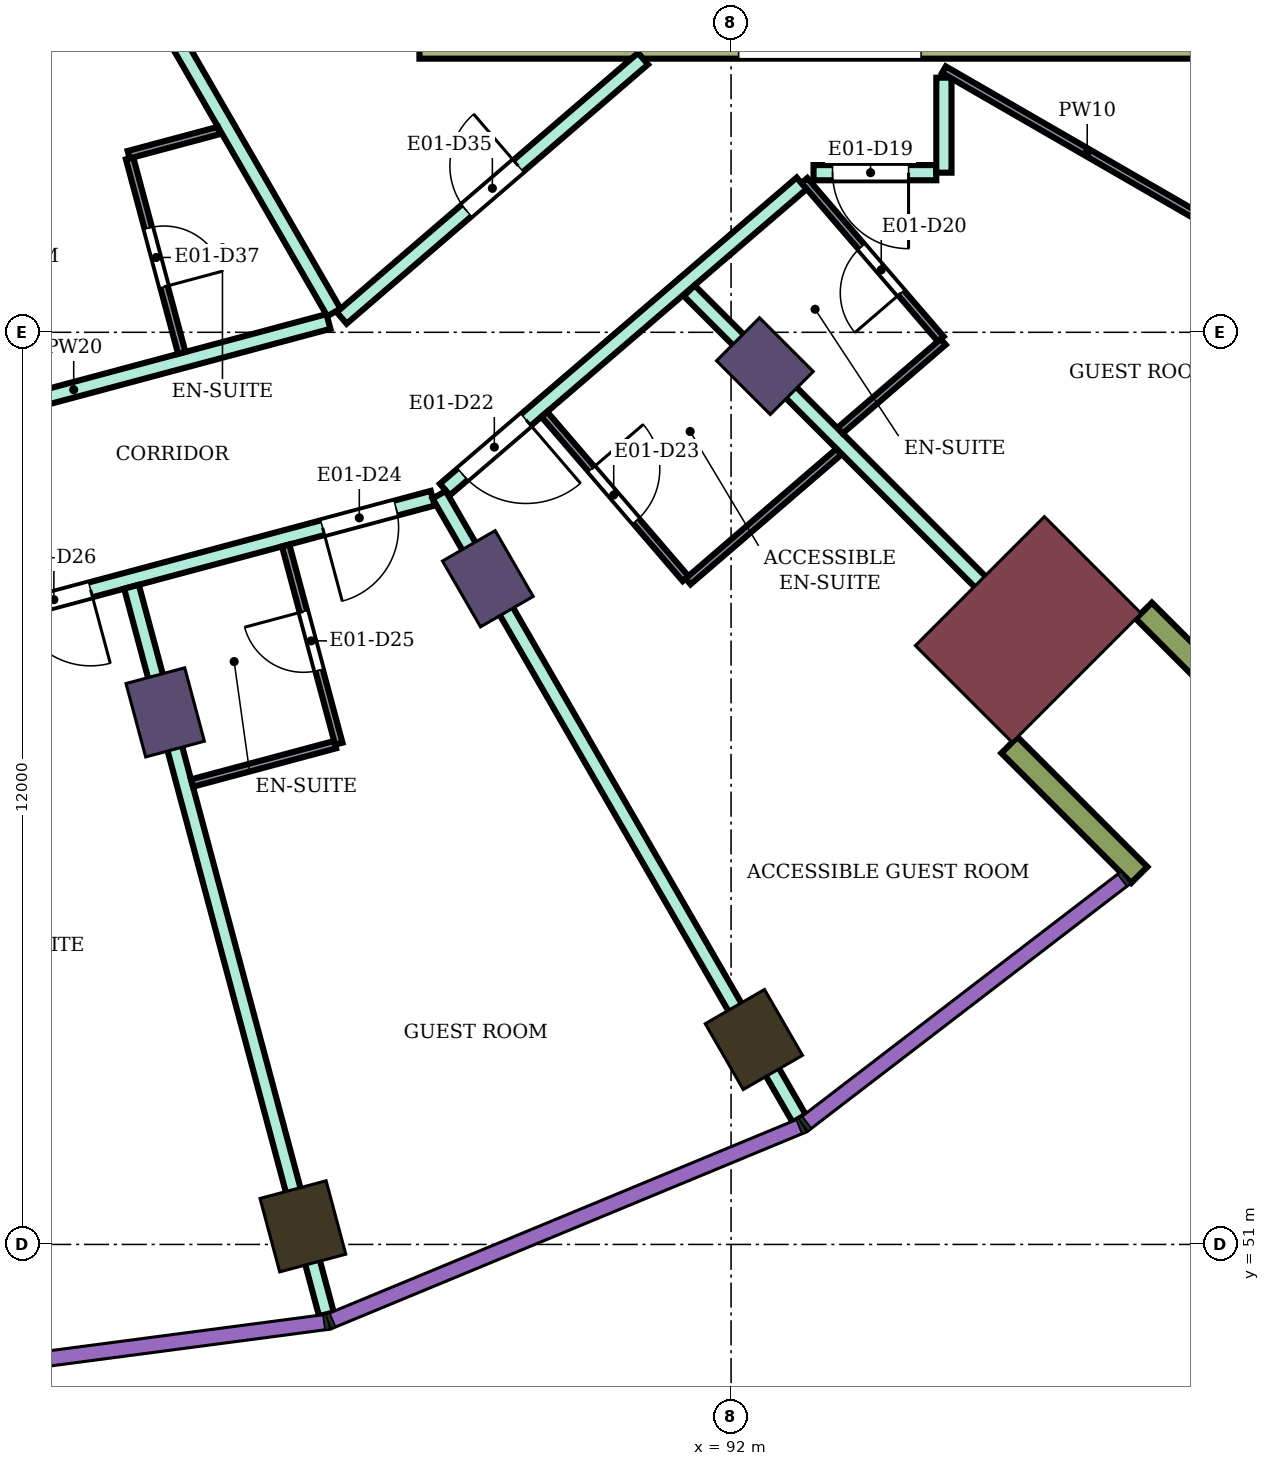
"""IFC4 building model, lengths in metres.
Left out: names, types, materials, properties, quantities, classifications, styles, units other than length and angle.
Written with IfcOpenShell. Run it as: python <this file> out.ifc"""

import sys

from ifc_helpers import new_model, si_unit, direction, frame, frame_2d, origin, origin_2d, place, context, subcontext, project, spatial, rectangle, extrude, element, fill, save


model = new_model("IFC4")
c1 = context("Model", 3, precision=1e-05, world=origin(), true_north=direction((0.0, 1.0)))
c2 = subcontext(c1, "Body", "Model", "MODEL_VIEW")
j1 = project(units=[si_unit("LENGTHUNIT", "METRE"), si_unit("PLANEANGLEUNIT", "RADIAN")], contexts=[c1])
p1 = place(None, origin())
s1 = spatial("IfcSite", under=j1, at=p1, CompositionType="ELEMENT")
p2 = place(p1, origin())
s2 = spatial("IfcBuilding", under=s1, at=p2, CompositionType="ELEMENT")
p3 = place(p2, frame((0.0, 0.0, 114.6)))
s3 = spatial("IfcBuildingStorey", under=s2, at=p3, CompositionType="ELEMENT", Elevation=114.6)
for number, where, z_axis, x_axis in (
    (1, (86.367, 51.238, 0.0), (0.0, 0.0, 1.0), (0.259, -0.966, 0.0)),
    (2, (92.3, 53.696, 0.0), (0.0, 0.0, 1.0), (0.5, -0.866, 0.0)),
):
    element("IfcColumn", number, at=place(p3, frame(where, z_axis=z_axis, x_axis=x_axis)), inside=s3, PredefinedType="COLUMN", context=c2, shape_type="SweptSolid", body=[
        extrude(rectangle(XDim=1.0, YDim=0.9, at=origin_2d()), origin(), (0.0, 0.0, 1.0), 3.9),
    ])
for number, where, z_axis, x_axis in (
    (3, (84.555, 58.0, 0.0), (0.0, 0.0, 1.0), (0.259, -0.966, 0.0)),
    (4, (88.8, 59.758, 0.0), (0.0, 0.0, 1.0), (0.5, -0.866, 0.0)),
    (5, (92.445, 62.555, 0.0), (0.0, 0.0, 1.0), (0.707, -0.707, 0.0)),
):
    element("IfcColumn", number, at=place(p3, frame(where, z_axis=z_axis, x_axis=x_axis)), inside=s3, PredefinedType="COLUMN", context=c2, shape_type="SweptSolid", body=[
        extrude(rectangle(XDim=1.0, YDim=0.8, at=origin_2d()), origin(), (0.0, 0.0, 1.0), 3.9),
    ])
p4 = place(p3, frame((95.91, 59.09, 0.0), z_axis=(0.0, 0.0, 1.0), x_axis=(0.707106781187, -0.707106781187, 0.0)))
e6 = element("IfcColumn", 6, at=p4, inside=s3, PredefinedType="COLUMN", context=c2, shape_type="SweptSolid", body=[
    extrude(rectangle(XDim=1.8, YDim=2.4, at=origin_2d()), origin(), (0.0, 0.0, 1.0), 3.9),
])
p5 = place(p3, frame((87.9, 66.95, 0.0), z_axis=(0.0, 0.0, 1.0), x_axis=(1.0, 0.0, 0.0)))
e7 = element("IfcWall", 7, at=p5, inside=s3, PredefinedType="SHEAR", context=c2, shape_type="SweptSolid", body=[
    extrude(rectangle(XDim=14.8, YDim=0.7, at=frame_2d((7.4, 0.0))), origin(), (0.0, 0.0, 1.0), 3.58),
])
p6 = place(p5, frame((4.2, 0.0, 0.0)))
e8 = element("IfcOpeningElement", 8, at=p6, cuts=e7, PredefinedType="OPENING", context=c2, shape_type="SweptSolid", body=[
    extrude(rectangle(XDim=2.4, YDim=2.4, at=frame_2d((1.2, 1.2))), frame((0.0, 0.36, 0.0), z_axis=(0.0, -1.0, 0.0), x_axis=(1.0, 0.0, 0.0)), (0.0, 0.0, 1.0), 0.72),
])
for number, where, z_axis, x_axis in (
    (9, (95.662, 57.57, 0.0), (0.0, 0.0, 1.0), (0.707, -0.707, 0.0)),
    (10, (97.43, 59.338, 0.0), (0.0, 0.0, 1.0), (0.707, -0.707, 0.0)),
):
    element("IfcWall", number, at=place(p3, frame(where, z_axis=z_axis, x_axis=x_axis)), inside=s3, PredefinedType="NOTDEFINED", context=c2, shape_type="SweptSolid", body=[
        extrude(rectangle(XDim=2.416, YDim=0.3, at=frame_2d((1.208, 0.0))), origin(), (0.0, 0.0, 1.0), 3.9),
    ])
p7 = place(p3, frame((80.0, 58.655, 0.0), z_axis=(0.0, 0.0, 1.0), x_axis=(0.965967338894, 0.258664068224, 0.0)))
e11 = element("IfcWall", 11, at=p7, inside=s3, PredefinedType="PARTITIONING", context=c2, shape_type="SweptSolid", body=[
    extrude(rectangle(XDim=8.36, YDim=0.2, at=frame_2d((4.18, 0.0))), origin(), (0.0, 0.0, 1.0), 3.45),
])
p8 = place(p7, frame((6.86, 0.0, 0.0)))
e12 = element("IfcOpeningElement", 12, at=p8, cuts=e11, PredefinedType="OPENING", context=c2, shape_type="SweptSolid", body=[
    extrude(rectangle(XDim=1.0, YDim=2.1, at=frame_2d((0.5, 1.05))), frame((0.0, 0.11, 0.0), z_axis=(0.0, -1.0, 0.0), x_axis=(1.0, 0.0, 0.0)), (0.0, 0.0, 1.0), 0.22),
])
p9 = place(p7, frame((2.7, 0.0, 0.0)))
e13 = element("IfcOpeningElement", 13, at=p9, cuts=e11, PredefinedType="OPENING", context=c2, shape_type="SweptSolid", body=[
    extrude(rectangle(XDim=1.0, YDim=2.1, at=frame_2d((0.5, 1.05))), frame((0.0, 0.11, 0.0), z_axis=(0.0, -1.0, 0.0), x_axis=(1.0, 0.0, 0.0)), (0.0, 0.0, 1.0), 0.22),
])
p10 = place(p3, frame((80.0, 61.346, 0.0), z_axis=(0.0, 0.0, 1.0), x_axis=(0.965924181808, 0.258825182312, 0.0)))
e14 = element("IfcWall", 14, at=p10, inside=s3, PredefinedType="PARTITIONING", context=c2, shape_type="SweptSolid", body=[
    extrude(rectangle(XDim=6.94, YDim=0.2, at=frame_2d((3.47, 0.0))), origin(), (0.0, 0.0, 1.0), 3.45),
])
p11 = place(p10, frame((0.55, 0.0, 0.0)))
e15 = element("IfcOpeningElement", 15, at=p11, cuts=e14, PredefinedType="OPENING", context=c2, shape_type="SweptSolid", body=[
    extrude(rectangle(XDim=1.0, YDim=2.1, at=frame_2d((0.5, 1.05))), frame((0.0, 0.11, 0.0), z_axis=(0.0, -1.0, 0.0), x_axis=(1.0, 0.0, 0.0)), (0.0, 0.0, 1.0), 0.22),
])
p12 = place(p3, frame((83.848, 68.332, 0.0), z_axis=(0.0, 0.0, 1.0), x_axis=(0.499933000352, -0.866064082594, 0.0)))
e16 = element("IfcWall", 16, at=p12, inside=s3, PredefinedType="PARTITIONING", context=c2, shape_type="SweptSolid", body=[
    extrude(rectangle(XDim=5.855, YDim=0.2, at=frame_2d((2.928, 0.0))), origin(), (0.0, 0.0, 1.0), 3.45),
])
p13 = place(p3, frame((84.112, 59.652, 0.0), z_axis=(0.0, 0.0, 1.0), x_axis=(0.258838718107, -0.965920554709, 0.0)))
e17 = element("IfcWall", 17, at=p13, inside=s3, PredefinedType="PARTITIONING", context=c2, shape_type="SweptSolid", body=[
    extrude(rectangle(XDim=9.908, YDim=0.2, at=frame_2d((4.954, 0.0))), origin(), (0.0, 0.0, 1.0), 3.45),
])
p14 = place(p3, frame((86.877, 63.189, 0.0), z_axis=(0.0, 0.0, 1.0), x_axis=(0.758075808328, 0.652166442581, 0.0)))
e18 = element("IfcWall", 18, at=p14, inside=s3, PredefinedType="PARTITIONING", context=c2, shape_type="SweptSolid", body=[
    extrude(rectangle(XDim=5.23, YDim=0.2, at=frame_2d((2.615, 0.0))), origin(), (0.0, 0.0, 1.0), 3.45),
])
p15 = place(p14, frame((2.165, 0.0, 0.0)))
e19 = element("IfcOpeningElement", 19, at=p15, cuts=e18, PredefinedType="OPENING", context=c2, shape_type="SweptSolid", body=[
    extrude(rectangle(XDim=0.9, YDim=2.1, at=frame_2d((0.45, 1.05))), frame((0.0, 0.11, 0.0), z_axis=(0.0, -1.0, 0.0), x_axis=(1.0, 0.0, 0.0)), (0.0, 0.0, 1.0), 0.22),
])
p16 = place(p3, frame((88.235, 60.931, 0.0), z_axis=(0.0, 0.0, 1.0), x_axis=(0.758816241808, 0.651304775945, 0.0)))
e20 = element("IfcWall", 20, at=p16, inside=s3, PredefinedType="PARTITIONING", context=c2, shape_type="SweptSolid", body=[
    extrude(rectangle(XDim=6.186, YDim=0.2, at=frame_2d((3.093, 0.0))), origin(), (0.0, 0.0, 1.0), 3.45),
])
p17 = place(p16, frame((0.308, 0.0, 0.0)))
e21 = element("IfcOpeningElement", 21, at=p17, cuts=e20, PredefinedType="OPENING", context=c2, shape_type="SweptSolid", body=[
    extrude(rectangle(XDim=1.1, YDim=2.1, at=frame_2d((0.55, 1.05))), frame((0.0, 0.11, 0.0), z_axis=(0.0, -1.0, 0.0), x_axis=(1.0, 0.0, 0.0)), (0.0, 0.0, 1.0), 0.22),
])
p18 = place(p3, frame((88.159, 60.863, 0.0), z_axis=(0.0, 0.0, 1.0), x_axis=(0.499935840196, -0.866062443296, 0.0)))
e22 = element("IfcWall", 22, at=p18, inside=s3, PredefinedType="PARTITIONING", context=c2, shape_type="SweptSolid", body=[
    extrude(rectangle(XDim=9.475, YDim=0.2, at=frame_2d((4.737, 0.0))), origin(), (0.0, 0.0, 1.0), 3.45),
])
p19 = place(p3, frame((91.449, 63.548, 0.0), z_axis=(0.0, 0.0, 1.0), x_axis=(0.706984804638, -0.707228736698, 0.0)))
e23 = element("IfcWall", 23, at=p19, inside=s3, PredefinedType="PARTITIONING", context=c2, shape_type="SweptSolid", body=[
    extrude(rectangle(XDim=7.006, YDim=0.2, at=frame_2d((3.503, 0.0))), origin(), (0.0, 0.0, 1.0), 3.45),
])
p20 = place(p3, frame((93.085, 65.1, 0.0), z_axis=(0.0, 0.0, 1.0), x_axis=(1.0, 0.0, 0.0)))
e24 = element("IfcWall", 24, at=p20, inside=s3, PredefinedType="PARTITIONING", context=c2, shape_type="SweptSolid", body=[
    extrude(rectangle(XDim=1.615, YDim=0.2, at=frame_2d((0.808, 0.0))), origin(), (0.0, 0.0, 1.0), 3.45),
])
p21 = place(p20, frame((0.25, 0.0, 0.0)))
e25 = element("IfcOpeningElement", 25, at=p21, cuts=e24, PredefinedType="OPENING", context=c2, shape_type="SweptSolid", body=[
    extrude(rectangle(XDim=1.0, YDim=2.1, at=frame_2d((0.5, 1.05))), frame((0.0, 0.11, 0.0), z_axis=(0.0, -1.0, 0.0), x_axis=(1.0, 0.0, 0.0)), (0.0, 0.0, 1.0), 0.22),
])
p22 = place(p3, frame((94.8, 65.1, 0.0), z_axis=(0.0, 0.0, 1.0), x_axis=(0.0, 1.0, 0.0)))
e26 = element("IfcWall", 26, at=p22, inside=s3, PredefinedType="PARTITIONING", context=c2, shape_type="SweptSolid", body=[
    extrude(rectangle(XDim=1.25, YDim=0.2, at=frame_2d((0.625, 0.0))), origin(), (0.0, 0.0, 1.0), 3.45),
])
p23 = place(p3, frame((84.087, 65.289, 0.0), z_axis=(0.0, 0.0, 1.0), x_axis=(0.258929459649, -0.965896234037, 0.0)))
e27 = element("IfcWall", 27, at=p23, inside=s3, PredefinedType="PARTITIONING", context=c2, shape_type="SweptSolid", body=[
    extrude(rectangle(XDim=2.65, YDim=0.1, at=frame_2d((1.325, 0.0))), origin(), (0.0, 0.0, 1.0), 3.45),
])
p24 = place(p23, frame((0.95, 0.0, 0.0)))
e28 = element("IfcOpeningElement", 28, at=p24, cuts=e27, PredefinedType="OPENING", context=c2, shape_type="SweptSolid", body=[
    extrude(rectangle(XDim=0.8, YDim=2.1, at=frame_2d((0.4, 1.05))), frame((0.0, 0.06, 0.0), z_axis=(0.0, -1.0, 0.0), x_axis=(1.0, 0.0, 0.0)), (0.0, 0.0, 1.0), 0.12),
])
p25 = place(p3, frame((84.074, 65.337, 0.0), z_axis=(0.0, 0.0, 1.0), x_axis=(0.965914351064, 0.258861867428, 0.0)))
e29 = element("IfcWall", 29, at=p25, inside=s3, PredefinedType="PARTITIONING", context=c2, shape_type="SweptSolid", body=[
    extrude(rectangle(XDim=1.229, YDim=0.1, at=frame_2d((0.615, 0.0))), origin(), (0.0, 0.0, 1.0), 3.45),
])
p26 = place(p3, frame((84.908, 57.07, 0.0), z_axis=(0.0, 0.0, 1.0), x_axis=(0.965853538138, 0.25908867761, 0.0)))
e30 = element("IfcWall", 30, at=p26, inside=s3, PredefinedType="PARTITIONING", context=c2, shape_type="SweptSolid", body=[
    extrude(rectangle(XDim=1.95, YDim=0.1, at=frame_2d((0.975, 0.0))), origin(), (0.0, 0.0, 1.0), 3.45),
])
p27 = place(p3, frame((86.14, 60.196, 0.0), z_axis=(0.0, 0.0, 1.0), x_axis=(0.258945475746, -0.965891940432, 0.0)))
e31 = element("IfcWall", 31, at=p27, inside=s3, PredefinedType="PARTITIONING", context=c2, shape_type="SweptSolid", body=[
    extrude(rectangle(XDim=2.7, YDim=0.1, at=frame_2d((1.35, 0.0))), origin(), (0.0, 0.0, 1.0), 3.45),
])
p28 = place(p27, frame((0.9, 0.0, 0.0)))
e32 = element("IfcOpeningElement", 32, at=p28, cuts=e31, PredefinedType="OPENING", context=c2, shape_type="SweptSolid", body=[
    extrude(rectangle(XDim=0.8, YDim=2.1, at=frame_2d((0.4, 1.05))), frame((0.0, 0.06, 0.0), z_axis=(0.0, -1.0, 0.0), x_axis=(1.0, 0.0, 0.0)), (0.0, 0.0, 1.0), 0.12),
])
p29 = place(p3, frame((89.543, 61.921, 0.0), z_axis=(0.0, 0.0, 1.0), x_axis=(0.651996917864, -0.758221616083, 0.0)))
e33 = element("IfcWall", 33, at=p29, inside=s3, PredefinedType="PARTITIONING", context=c2, shape_type="SweptSolid", body=[
    extrude(rectangle(XDim=2.85, YDim=0.1, at=frame_2d((1.425, 0.0))), origin(), (0.0, 0.0, 1.0), 3.45),
])
p30 = place(p29, frame((0.95, 0.0, 0.0)))
e34 = element("IfcOpeningElement", 34, at=p30, cuts=e33, PredefinedType="OPENING", context=c2, shape_type="SweptSolid", body=[
    extrude(rectangle(XDim=0.9, YDim=2.1, at=frame_2d((0.45, 1.05))), frame((0.0, 0.06, 0.0), z_axis=(0.0, -1.0, 0.0), x_axis=(1.0, 0.0, 0.0)), (0.0, 0.0, 1.0), 0.12),
])
p31 = place(p3, frame((91.434, 59.722, 0.0), z_axis=(0.0, 0.0, 1.0), x_axis=(0.758076316785, 0.652165851552, 0.0)))
e35 = element("IfcWall", 35, at=p31, inside=s3, PredefinedType="PARTITIONING", context=c2, shape_type="SweptSolid", body=[
    extrude(rectangle(XDim=2.616, YDim=0.1, at=frame_2d((1.308, 0.0))), origin(), (0.0, 0.0, 1.0), 3.45),
])
p32 = place(p3, frame((92.965, 64.997, 0.0), z_axis=(0.0, 0.0, 1.0), x_axis=(0.652069888227, -0.758158862553, 0.0)))
e36 = element("IfcWall", 36, at=p32, inside=s3, PredefinedType="PARTITIONING", context=c2, shape_type="SweptSolid", body=[
    extrude(rectangle(XDim=2.75, YDim=0.1, at=frame_2d((1.375, 0.0))), origin(), (0.0, 0.0, 1.0), 3.45),
])
p33 = place(p32, frame((1.15, 0.0, 0.0)))
e37 = element("IfcOpeningElement", 37, at=p33, cuts=e36, PredefinedType="OPENING", context=c2, shape_type="SweptSolid", body=[
    extrude(rectangle(XDim=0.8, YDim=2.1, at=frame_2d((0.4, 1.05))), frame((0.0, 0.06, 0.0), z_axis=(0.0, -1.0, 0.0), x_axis=(1.0, 0.0, 0.0)), (0.0, 0.0, 1.0), 0.12),
])
p34 = place(p3, frame((93.435, 61.707, 0.0), z_axis=(0.0, 0.0, 1.0), x_axis=(0.758070495124, 0.652172618578, 0.0)))
e38 = element("IfcWall", 38, at=p34, inside=s3, PredefinedType="PARTITIONING", context=c2, shape_type="SweptSolid", body=[
    extrude(rectangle(XDim=1.789, YDim=0.1, at=frame_2d((0.895, 0.0))), origin(), (0.0, 0.0, 1.0), 3.45),
])
p35 = place(p3, frame((94.8, 66.455, 0.0), z_axis=(0.0, 0.0, 1.0), x_axis=(0.86602264145, -0.500004784474, 0.0)))
e39 = element("IfcWall", 39, at=p35, inside=s3, PredefinedType="PARTITIONING", context=c2, shape_type="SweptSolid", body=[
    extrude(rectangle(XDim=8.708, YDim=0.1, at=frame_2d((4.354, 0.0))), origin(), (0.0, 0.0, 1.0), 3.45),
])
p36 = place(p35, frame((3.879, 0.0, 0.0)))
e40 = element("IfcOpeningElement", 40, at=p36, cuts=e39, PredefinedType="OPENING", context=c2, shape_type="SweptSolid", body=[
    extrude(rectangle(XDim=0.9, YDim=2.1, at=frame_2d((0.45, 1.05))), frame((0.0, 0.06, 0.0), z_axis=(0.0, -1.0, 0.0), x_axis=(1.0, 0.0, 0.0)), (0.0, 0.0, 1.0), 0.12),
])
p37 = place(p21, frame((1.0, 0.0, 0.0), z_axis=(0.0, 0.0, 1.0), x_axis=(-1.0, 0.0, 0.0)))
e41 = element("IfcDoor", 41, at=p37, inside=s3, OperationType="SINGLE_SWING_LEFT", PredefinedType="DOOR", context=c2, shape_type="SweptSolid", body=[
    extrude(rectangle(XDim=1.0, YDim=2.1, at=frame_2d((0.5, 1.05))), frame((0.0, 0.025, 0.0), z_axis=(0.0, -1.0, 0.0), x_axis=(1.0, 0.0, 0.0)), (0.0, 0.0, 1.0), 0.05),
])
fill(e25, e41)
p38 = place(p33, frame((0.8, 0.0, 0.0), z_axis=(0.0, 0.0, 1.0), x_axis=(-1.0, 0.0, 0.0)))
e42 = element("IfcDoor", 42, at=p38, inside=s3, OperationType="SINGLE_SWING_LEFT", PredefinedType="DOOR", context=c2, shape_type="SweptSolid", body=[
    extrude(rectangle(XDim=0.8, YDim=2.1, at=frame_2d((0.4, 1.05))), frame((0.0, 0.025, 0.0), z_axis=(0.0, -1.0, 0.0), x_axis=(1.0, 0.0, 0.0)), (0.0, 0.0, 1.0), 0.05),
])
fill(e37, e42)
p39 = place(p17, frame((1.1, 0.0, 0.0), z_axis=(0.0, 0.0, 1.0), x_axis=(-1.0, 0.0, 0.0)))
e43 = element("IfcDoor", 43, at=p39, inside=s3, OperationType="SINGLE_SWING_LEFT", PredefinedType="DOOR", context=c2, shape_type="SweptSolid", body=[
    extrude(rectangle(XDim=1.1, YDim=2.1, at=frame_2d((0.55, 1.05))), frame((0.0, 0.025, 0.0), z_axis=(0.0, -1.0, 0.0), x_axis=(1.0, 0.0, 0.0)), (0.0, 0.0, 1.0), 0.05),
])
fill(e21, e43)
p40 = place(p30, origin())
e44 = element("IfcDoor", 44, at=p40, inside=s3, OperationType="SINGLE_SWING_LEFT", PredefinedType="DOOR", context=c2, shape_type="SweptSolid", body=[
    extrude(rectangle(XDim=0.9, YDim=2.1, at=frame_2d((0.45, 1.05))), frame((0.0, 0.025, 0.0), z_axis=(0.0, -1.0, 0.0), x_axis=(1.0, 0.0, 0.0)), (0.0, 0.0, 1.0), 0.05),
])
fill(e34, e44)
p41 = place(p8, frame((1.0, 0.0, 0.0), z_axis=(0.0, 0.0, 1.0), x_axis=(-1.0, 0.0, 0.0)))
e45 = element("IfcDoor", 45, at=p41, inside=s3, OperationType="SINGLE_SWING_RIGHT", PredefinedType="DOOR", context=c2, shape_type="SweptSolid", body=[
    extrude(rectangle(XDim=1.0, YDim=2.1, at=frame_2d((0.5, 1.05))), frame((0.0, 0.025, 0.0), z_axis=(0.0, -1.0, 0.0), x_axis=(1.0, 0.0, 0.0)), (0.0, 0.0, 1.0), 0.05),
])
fill(e12, e45)
p42 = place(p28, frame((0.8, 0.0, 0.0), z_axis=(0.0, 0.0, 1.0), x_axis=(-1.0, 0.0, 0.0)))
e46 = element("IfcDoor", 46, at=p42, inside=s3, OperationType="SINGLE_SWING_RIGHT", PredefinedType="DOOR", context=c2, shape_type="SweptSolid", body=[
    extrude(rectangle(XDim=0.8, YDim=2.1, at=frame_2d((0.4, 1.05))), frame((0.0, 0.025, 0.0), z_axis=(0.0, -1.0, 0.0), x_axis=(1.0, 0.0, 0.0)), (0.0, 0.0, 1.0), 0.05),
])
fill(e32, e46)
p43 = place(p9, frame((1.0, 0.0, 0.0), z_axis=(0.0, 0.0, 1.0), x_axis=(-1.0, 0.0, 0.0)))
e47 = element("IfcDoor", 47, at=p43, inside=s3, OperationType="SINGLE_SWING_LEFT", PredefinedType="DOOR", context=c2, shape_type="SweptSolid", body=[
    extrude(rectangle(XDim=1.0, YDim=2.1, at=frame_2d((0.5, 1.05))), frame((0.0, 0.025, 0.0), z_axis=(0.0, -1.0, 0.0), x_axis=(1.0, 0.0, 0.0)), (0.0, 0.0, 1.0), 0.05),
])
fill(e13, e47)
p44 = place(p15, origin())
e48 = element("IfcDoor", 48, at=p44, inside=s3, OperationType="SINGLE_SWING_RIGHT", PredefinedType="DOOR", context=c2, shape_type="SweptSolid", body=[
    extrude(rectangle(XDim=0.9, YDim=2.1, at=frame_2d((0.45, 1.05))), frame((0.0, 0.025, 0.0), z_axis=(0.0, -1.0, 0.0), x_axis=(1.0, 0.0, 0.0)), (0.0, 0.0, 1.0), 0.05),
])
fill(e19, e48)
p45 = place(p24, origin())
e49 = element("IfcDoor", 49, at=p45, inside=s3, OperationType="SINGLE_SWING_RIGHT", PredefinedType="DOOR", context=c2, shape_type="SweptSolid", body=[
    extrude(rectangle(XDim=0.8, YDim=2.1, at=frame_2d((0.4, 1.05))), frame((0.0, 0.025, 0.0), z_axis=(0.0, -1.0, 0.0), x_axis=(1.0, 0.0, 0.0)), (0.0, 0.0, 1.0), 0.05),
])
fill(e28, e49)
save(model, sys.argv[1])
